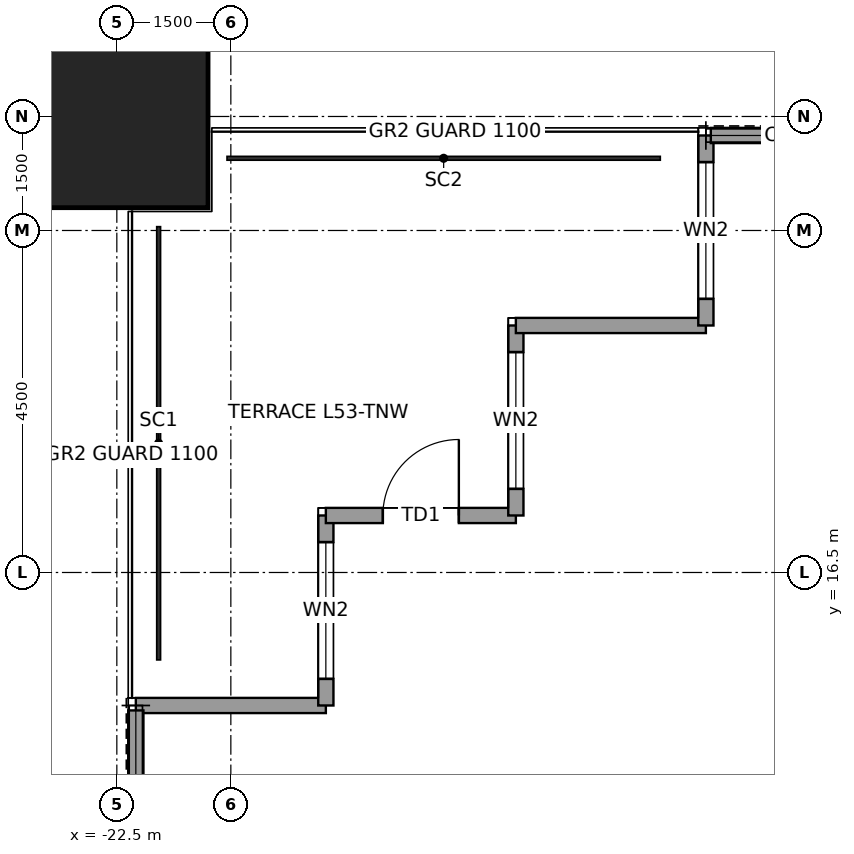
"""IFC4 building model, lengths in metres.
Left out: names, types, materials, properties, quantities, classifications, styles, units other than length and angle.
Written with IfcOpenShell. Run it as: python <this file> out.ifc"""

import sys

from ifc_helpers import new_model, si_unit, direction, frame, frame_2d, origin, origin_2d, place, context, subcontext, project, spatial, rectangle, hollow_rectangle, extrude, element, fill, save


model = new_model("IFC4")
c1 = context("Model", 3, precision=1e-05, world=origin(), true_north=direction((0.0, 1.0)))
c2 = subcontext(c1, "Body", "Model", "MODEL_VIEW")
j1 = project(units=[si_unit("LENGTHUNIT", "METRE"), si_unit("PLANEANGLEUNIT", "RADIAN")], contexts=[c1])
p1 = place(None, origin())
s1 = spatial("IfcSite", under=j1, at=p1, CompositionType="ELEMENT")
p2 = place(p1, origin())
s2 = spatial("IfcBuilding", under=s1, at=p2, CompositionType="ELEMENT")
p3 = place(p2, frame((0.0, 0.0, 245.9)))
s3 = spatial("IfcBuildingStorey", under=s2, at=p3, CompositionType="ELEMENT", Elevation=245.9)
p4 = place(p3, frame((-22.5, 22.5, 0.0), z_axis=(0.0, 0.0, 1.0), x_axis=(1.0, 0.0, 0.0)))
e1 = element("IfcColumn", 1, at=p4, inside=s3, PredefinedType="COLUMN", context=c2, shape_type="SweptSolid", body=[
    extrude(hollow_rectangle(XDim=2.4, YDim=2.4, WallThickness=0.12, at=origin_2d()), origin(), (0.0, 0.0, 1.0), 4.0),
])
p5 = place(p3, frame((-22.25, 14.75, 0.0), z_axis=(0.0, 0.0, 1.0), x_axis=(1.0, 0.0, 0.0)))
e2 = element("IfcWall", 2, at=p5, inside=s3, PredefinedType="SOLIDWALL", context=c2, shape_type="SweptSolid", body=[
    extrude(rectangle(XDim=2.5, YDim=0.2, at=frame_2d((1.25, 0.0))), origin(), (0.0, 0.0, 1.0), 3.85),
])
p6 = place(p3, frame((-19.75, 14.75, 0.0), z_axis=(0.0, 0.0, 1.0), x_axis=(0.0, 1.0, 0.0)))
e3 = element("IfcWall", 3, at=p6, inside=s3, PredefinedType="SOLIDWALL", context=c2, shape_type="SweptSolid", body=[
    extrude(rectangle(XDim=2.5, YDim=0.2, at=frame_2d((1.25, 0.0))), origin(), (0.0, 0.0, 1.0), 3.85),
])
p7 = place(p6, frame((0.35, 0.0, 0.3)))
e4 = element("IfcOpeningElement", 4, at=p7, cuts=e3, PredefinedType="OPENING", context=c2, shape_type="SweptSolid", body=[
    extrude(rectangle(XDim=1.8, YDim=2.4, at=frame_2d((0.9, 1.2))), frame((0.0, 0.11, 0.0), z_axis=(0.0, -1.0, 0.0), x_axis=(1.0, 0.0, 0.0)), (0.0, 0.0, 1.0), 0.22),
])
p8 = place(p3, frame((-19.75, 17.25, 0.0), z_axis=(0.0, 0.0, 1.0), x_axis=(1.0, 0.0, 0.0)))
e5 = element("IfcWall", 5, at=p8, inside=s3, PredefinedType="SOLIDWALL", context=c2, shape_type="SweptSolid", body=[
    extrude(rectangle(XDim=2.5, YDim=0.2, at=frame_2d((1.25, 0.0))), origin(), (0.0, 0.0, 1.0), 3.85),
])
p9 = place(p8, frame((0.75, 0.0, 0.0)))
e6 = element("IfcOpeningElement", 6, at=p9, cuts=e5, PredefinedType="OPENING", context=c2, shape_type="SweptSolid", body=[
    extrude(rectangle(XDim=1.0, YDim=2.4, at=frame_2d((0.5, 1.2))), frame((0.0, 0.11, 0.0), z_axis=(0.0, -1.0, 0.0), x_axis=(1.0, 0.0, 0.0)), (0.0, 0.0, 1.0), 0.22),
])
p10 = place(p3, frame((-17.25, 17.25, 0.0), z_axis=(0.0, 0.0, 1.0), x_axis=(0.0, 1.0, 0.0)))
e7 = element("IfcWall", 7, at=p10, inside=s3, PredefinedType="SOLIDWALL", context=c2, shape_type="SweptSolid", body=[
    extrude(rectangle(XDim=2.5, YDim=0.2, at=frame_2d((1.25, 0.0))), origin(), (0.0, 0.0, 1.0), 3.85),
])
p11 = place(p10, frame((0.35, 0.0, 0.3)))
e8 = element("IfcOpeningElement", 8, at=p11, cuts=e7, PredefinedType="OPENING", context=c2, shape_type="SweptSolid", body=[
    extrude(rectangle(XDim=1.8, YDim=2.4, at=frame_2d((0.9, 1.2))), frame((0.0, 0.11, 0.0), z_axis=(0.0, -1.0, 0.0), x_axis=(1.0, 0.0, 0.0)), (0.0, 0.0, 1.0), 0.22),
])
p12 = place(p3, frame((-17.25, 19.75, 0.0), z_axis=(0.0, 0.0, 1.0), x_axis=(1.0, 0.0, 0.0)))
e9 = element("IfcWall", 9, at=p12, inside=s3, PredefinedType="SOLIDWALL", context=c2, shape_type="SweptSolid", body=[
    extrude(rectangle(XDim=2.5, YDim=0.2, at=frame_2d((1.25, 0.0))), origin(), (0.0, 0.0, 1.0), 3.85),
])
p13 = place(p3, frame((-14.75, 19.75, 0.0), z_axis=(0.0, 0.0, 1.0), x_axis=(0.0, 1.0, 0.0)))
e10 = element("IfcWall", 10, at=p13, inside=s3, PredefinedType="SOLIDWALL", context=c2, shape_type="SweptSolid", body=[
    extrude(rectangle(XDim=2.5, YDim=0.2, at=frame_2d((1.25, 0.0))), origin(), (0.0, 0.0, 1.0), 3.85),
])
p14 = place(p13, frame((0.35, 0.0, 0.3)))
e11 = element("IfcOpeningElement", 11, at=p14, cuts=e10, PredefinedType="OPENING", context=c2, shape_type="SweptSolid", body=[
    extrude(rectangle(XDim=1.8, YDim=2.4, at=frame_2d((0.9, 1.2))), frame((0.0, 0.11, 0.0), z_axis=(0.0, -1.0, 0.0), x_axis=(1.0, 0.0, 0.0)), (0.0, 0.0, 1.0), 0.22),
])
for number, where, z_axis, x_axis in (
    (12, (-14.685, 22.25, 0.0), (0.0, 0.0, 1.0), (1.0, 0.0, 0.0)),
    (13, (-22.25, 12.398, 0.0), (0.0, 0.0, 1.0), (0.0, 1.0, 0.0)),
):
    element("IfcWall", number, at=place(p3, frame(where, z_axis=z_axis, x_axis=x_axis)), inside=s3, PredefinedType="SOLIDWALL", context=c2, shape_type="SweptSolid", body=[
        extrude(rectangle(XDim=2.287, YDim=0.2, at=frame_2d((1.144, 0.0))), origin(), (0.0, 0.0, 1.0), 3.85),
    ])
p15 = place(p7, origin())
e14 = element("IfcWindow", 14, at=p15, inside=s3, PartitioningType="SINGLE_PANEL", PredefinedType="WINDOW", context=c2, shape_type="SweptSolid", body=[
    extrude(rectangle(XDim=1.8, YDim=2.4, at=frame_2d((0.9, 1.2))), frame((0.0, 0.03, 0.0), z_axis=(0.0, -1.0, 0.0), x_axis=(1.0, 0.0, 0.0)), (0.0, 0.0, 1.0), 0.06),
])
fill(e4, e14)
p16 = place(p9, origin())
e15 = element("IfcDoor", 15, at=p16, inside=s3, OperationType="SINGLE_SWING_RIGHT", PredefinedType="DOOR", context=c2, shape_type="SweptSolid", body=[
    extrude(rectangle(XDim=1.0, YDim=2.4, at=frame_2d((0.5, 1.2))), frame((0.0, 0.025, 0.0), z_axis=(0.0, -1.0, 0.0), x_axis=(1.0, 0.0, 0.0)), (0.0, 0.0, 1.0), 0.05),
])
fill(e6, e15)
p17 = place(p11, origin())
e16 = element("IfcWindow", 16, at=p17, inside=s3, PartitioningType="SINGLE_PANEL", PredefinedType="WINDOW", context=c2, shape_type="SweptSolid", body=[
    extrude(rectangle(XDim=1.8, YDim=2.4, at=frame_2d((0.9, 1.2))), frame((0.0, 0.03, 0.0), z_axis=(0.0, -1.0, 0.0), x_axis=(1.0, 0.0, 0.0)), (0.0, 0.0, 1.0), 0.06),
])
fill(e8, e16)
p18 = place(p14, origin())
e17 = element("IfcWindow", 17, at=p18, inside=s3, PartitioningType="SINGLE_PANEL", PredefinedType="WINDOW", context=c2, shape_type="SweptSolid", body=[
    extrude(rectangle(XDim=1.8, YDim=2.4, at=frame_2d((0.9, 1.2))), frame((0.0, 0.03, 0.0), z_axis=(0.0, -1.0, 0.0), x_axis=(1.0, 0.0, 0.0)), (0.0, 0.0, 1.0), 0.06),
])
fill(e11, e17)
save(model, sys.argv[1])
